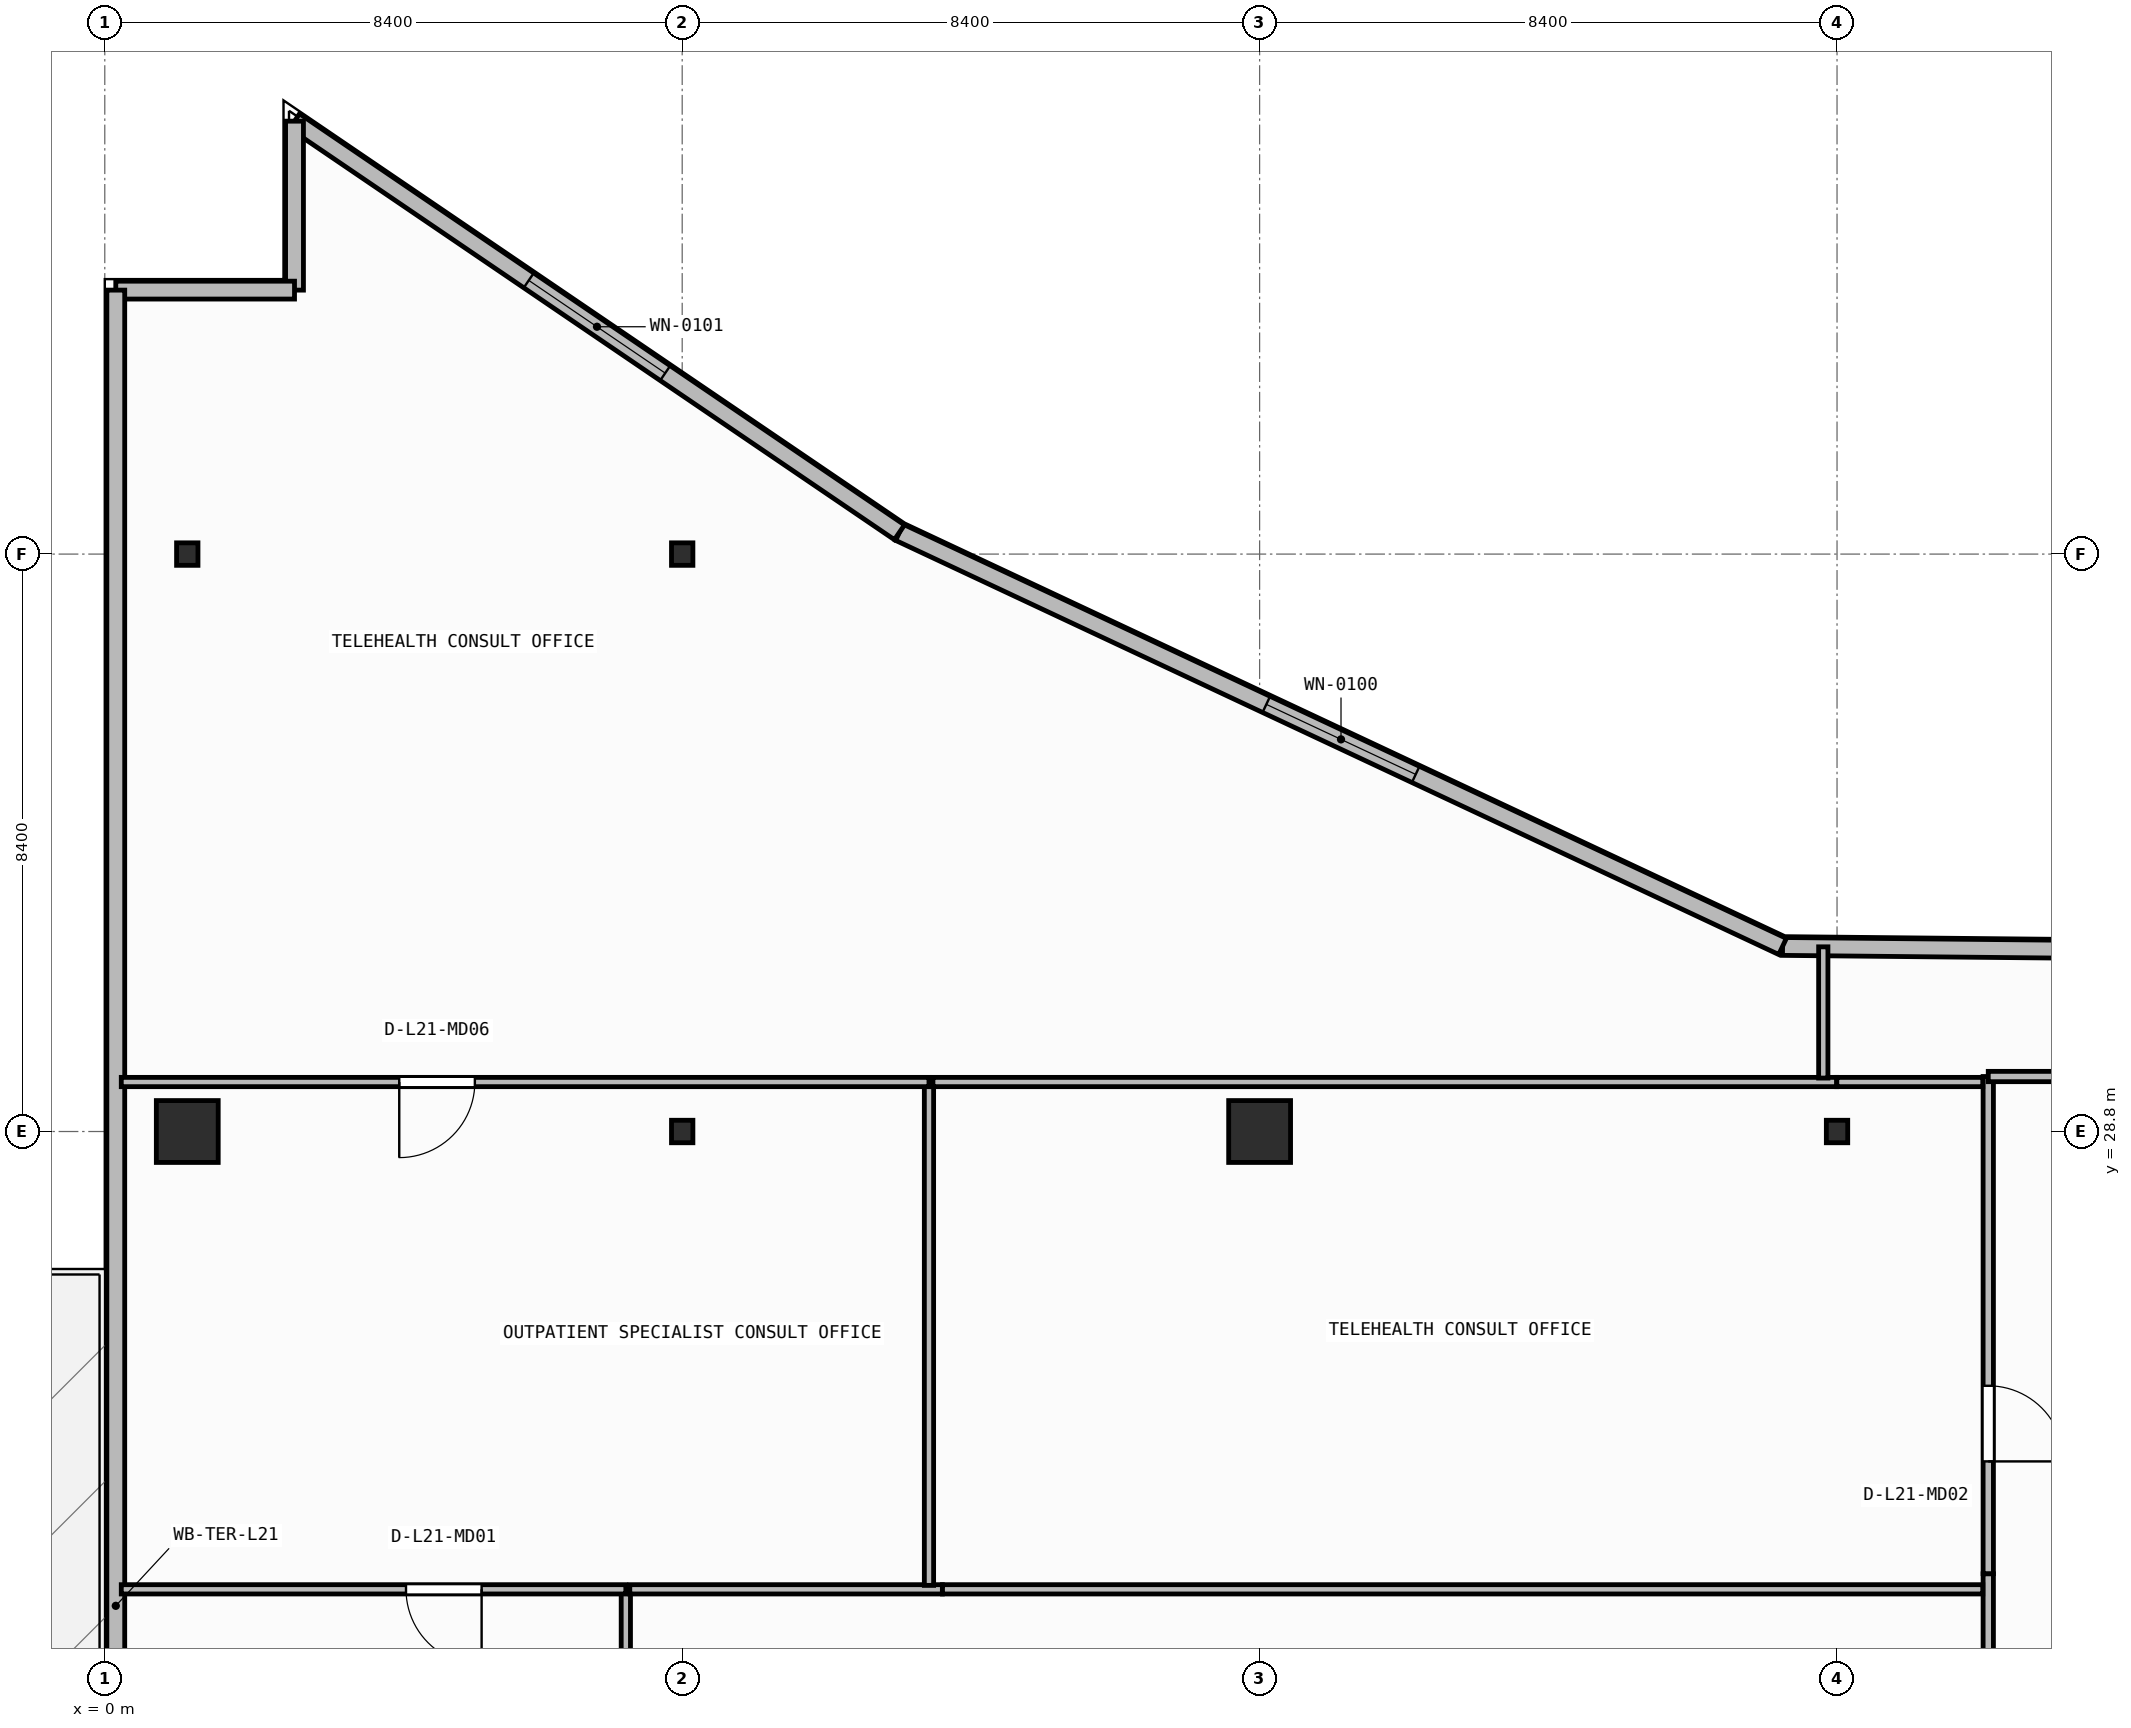
"""IFC4 building model, lengths in metres.
Left out: names, types, materials, properties, quantities, classifications, styles, units other than length and angle.
Written with IfcOpenShell. Run it as: python <this file> out.ifc"""

import sys

from ifc_helpers import new_model, si_unit, direction, frame, frame_2d, origin, origin_2d, place, context, subcontext, project, spatial, rectangle, i_section, extrude, element, fill, save


model = new_model("IFC4")
c1 = context("Model", 3, precision=1e-05, world=origin(), true_north=direction((0.0, 1.0)))
c2 = subcontext(c1, "Body", "Model", "MODEL_VIEW")
j1 = project(units=[si_unit("LENGTHUNIT", "METRE"), si_unit("PLANEANGLEUNIT", "RADIAN")], contexts=[c1])
p1 = place(None, origin())
s1 = spatial("IfcSite", under=j1, at=p1, CompositionType="ELEMENT")
p2 = place(p1, origin())
s2 = spatial("IfcBuilding", under=s1, at=p2, CompositionType="ELEMENT")
p3 = place(p2, frame((0.0, 0.0, 85.7)))
s3 = spatial("IfcBuildingStorey", under=s2, at=p3, CompositionType="ELEMENT", Elevation=85.7)
p4 = place(p3, frame((1.2, 28.8, 0.0), z_axis=(0.0, 0.0, 1.0), x_axis=(1.0, 0.0, 0.0)))
e1 = element("IfcColumn", 1, at=p4, inside=s3, PredefinedType="COLUMN", context=c2, shape_type="SweptSolid", body=[
    extrude(rectangle(XDim=0.9, YDim=0.9, at=origin_2d()), origin(), (0.0, 0.0, 1.0), 3.95),
])
p5 = place(p3, frame((8.4, 28.8, 0.0), z_axis=(0.0, 0.0, 1.0), x_axis=(1.0, 0.0, 0.0)))
e2 = element("IfcColumn", 2, at=p5, inside=s3, PredefinedType="COLUMN", context=c2, shape_type="SweptSolid", body=[
    extrude(i_section(OverallWidth=0.311, OverallDepth=0.327, WebThickness=0.016, FlangeThickness=0.025, FilletRadius=0.017, at=origin_2d()), origin(), (0.0, 0.0, 1.0), 3.95),
])
p6 = place(p3, frame((16.8, 28.8, 0.0), z_axis=(0.0, 0.0, 1.0), x_axis=(1.0, 0.0, 0.0)))
e3 = element("IfcColumn", 3, at=p6, inside=s3, PredefinedType="COLUMN", context=c2, shape_type="SweptSolid", body=[
    extrude(rectangle(XDim=0.9, YDim=0.9, at=origin_2d()), origin(), (0.0, 0.0, 1.0), 3.95),
])
for number, where, z_axis, x_axis in (
    (4, (25.2, 28.8, 0.0), (0.0, 0.0, 1.0), (1.0, 0.0, 0.0)),
    (5, (1.2, 37.2, 0.0), (0.0, 0.0, 1.0), (1.0, 0.0, 0.0)),
    (6, (8.4, 37.2, 0.0), (0.0, 0.0, 1.0), (1.0, 0.0, 0.0)),
):
    element("IfcColumn", number, at=place(p3, frame(where, z_axis=z_axis, x_axis=x_axis)), inside=s3, PredefinedType="COLUMN", context=c2, shape_type="SweptSolid", body=[
        extrude(i_section(OverallWidth=0.311, OverallDepth=0.327, WebThickness=0.016, FlangeThickness=0.025, FilletRadius=0.017, at=origin_2d()), origin(), (0.0, 0.0, 1.0), 3.95),
    ])
p7 = place(p3, frame((39.59, 31.344, 0.0), z_axis=(0.0, 0.0, 1.0), x_axis=(-0.999952362926, 0.009760731435, 0.0)))
e7 = element("IfcWall", 7, at=p7, inside=s3, PredefinedType="STANDARD", context=c2, shape_type="SweptSolid", body=[
    extrude(rectangle(XDim=15.183, YDim=0.26, at=frame_2d((7.591, 0.0))), origin(), (0.0, 0.0, 1.0), 3.71),
])
p8 = place(p7, frame((6.391, 0.0, 0.9)))
e8 = element("IfcOpeningElement", 8, at=p8, cuts=e7, PredefinedType="OPENING", context=c2, shape_type="SweptSolid", body=[
    extrude(rectangle(XDim=2.4, YDim=1.65, at=frame_2d((1.2, 0.825))), frame((0.0, 0.14, 0.0), z_axis=(0.0, -1.0, 0.0), x_axis=(1.0, 0.0, 0.0)), (0.0, 0.0, 1.0), 0.28),
])
p9 = place(p3, frame((24.408, 31.492, 0.0), z_axis=(0.0, 0.0, 1.0), x_axis=(-0.905396522918, 0.424566998585, 0.0)))
e9 = element("IfcWall", 9, at=p9, inside=s3, PredefinedType="STANDARD", context=c2, shape_type="SweptSolid", body=[
    extrude(rectangle(XDim=14.189, YDim=0.26, at=frame_2d((7.095, 0.0))), origin(), (0.0, 0.0, 1.0), 3.71),
])
p10 = place(p9, frame((5.895, 0.0, 0.9)))
e10 = element("IfcOpeningElement", 10, at=p10, cuts=e9, PredefinedType="OPENING", context=c2, shape_type="SweptSolid", body=[
    extrude(rectangle(XDim=2.4, YDim=1.65, at=frame_2d((1.2, 0.825))), frame((0.0, 0.14, 0.0), z_axis=(0.0, -1.0, 0.0), x_axis=(1.0, 0.0, 0.0)), (0.0, 0.0, 1.0), 0.28),
])
p11 = place(p3, frame((11.561, 37.517, 0.0), z_axis=(0.0, 0.0, 1.0), x_axis=(-0.827064743936, 0.562106670782, 0.0)))
e11 = element("IfcWall", 11, at=p11, inside=s3, PredefinedType="STANDARD", context=c2, shape_type="SweptSolid", body=[
    extrude(rectangle(XDim=10.641, YDim=0.26, at=frame_2d((5.32, 0.0))), origin(), (0.0, 0.0, 1.0), 3.71),
])
p12 = place(p11, frame((4.12, 0.0, 0.9)))
e12 = element("IfcOpeningElement", 12, at=p12, cuts=e11, PredefinedType="OPENING", context=c2, shape_type="SweptSolid", body=[
    extrude(rectangle(XDim=2.4, YDim=1.65, at=frame_2d((1.2, 0.825))), frame((0.0, 0.14, 0.0), z_axis=(0.0, -1.0, 0.0), x_axis=(1.0, 0.0, 0.0)), (0.0, 0.0, 1.0), 0.28),
])
p13 = place(p3, frame((2.76, 43.498, 0.0), z_axis=(0.0, 0.0, 1.0), x_axis=(0.0, -1.0, 0.0)))
e13 = element("IfcWall", 13, at=p13, inside=s3, PredefinedType="STANDARD", context=c2, shape_type="SweptSolid", body=[
    extrude(rectangle(XDim=2.458, YDim=0.26, at=frame_2d((1.229, 0.0))), origin(), (0.0, 0.0, 1.0), 3.71),
])
p14 = place(p3, frame((2.76, 41.04, 0.0), z_axis=(0.0, 0.0, 1.0), x_axis=(-1.0, 0.0, 0.0)))
e14 = element("IfcWall", 14, at=p14, inside=s3, PredefinedType="STANDARD", context=c2, shape_type="SweptSolid", body=[
    extrude(rectangle(XDim=2.6, YDim=0.26, at=frame_2d((1.3, 0.0))), origin(), (0.0, 0.0, 1.0), 3.71),
])
p15 = place(p3, frame((0.16, 41.04, 0.0), z_axis=(0.0, 0.0, 1.0), x_axis=(0.0, -1.0, 0.0)))
e15 = element("IfcWall", 15, at=p15, inside=s3, PredefinedType="STANDARD", context=c2, shape_type="SweptSolid", body=[
    extrude(rectangle(XDim=38.28, YDim=0.26, at=frame_2d((19.14, 0.0))), origin(), (0.0, 0.0, 1.0), 3.71),
])
p16 = place(p15, frame((22.743, 0.0, 0.0)))
e16 = element("IfcOpeningElement", 16, at=p16, cuts=e15, PredefinedType="OPENING", context=c2, shape_type="SweptSolid", body=[
    extrude(rectangle(XDim=1.3, YDim=2.15, at=frame_2d((0.65, 1.075))), frame((0.0, 0.14, 0.0), z_axis=(0.0, -1.0, 0.0), x_axis=(1.0, 0.0, 0.0)), (0.0, 0.0, 1.0), 0.28),
])
p17 = place(p3, frame((27.4, 22.366, 0.0), z_axis=(0.0, 0.0, 1.0), x_axis=(0.0, -1.0, 0.0)))
e17 = element("IfcWall", 17, at=p17, inside=s3, PredefinedType="PARTITIONING", context=c2, shape_type="SweptSolid", body=[
    extrude(rectangle(XDim=7.666, YDim=0.15, at=frame_2d((3.833, 0.0))), origin(), (0.0, 0.0, 1.0), 3.71),
])
p18 = place(p3, frame((27.4, 29.6, 0.0), z_axis=(0.0, 0.0, 1.0), x_axis=(0.0, -1.0, 0.0)))
e18 = element("IfcWall", 18, at=p18, inside=s3, PredefinedType="PARTITIONING", context=c2, shape_type="SweptSolid", body=[
    extrude(rectangle(XDim=7.232, YDim=0.15, at=frame_2d((3.616, 0.0))), origin(), (0.0, 0.0, 1.0), 3.71),
])
p19 = place(p18, frame((4.499, 0.0, 0.0)))
e19 = element("IfcOpeningElement", 19, at=p19, cuts=e18, PredefinedType="OPENING", context=c2, shape_type="SweptSolid", body=[
    extrude(rectangle(XDim=1.1, YDim=2.1, at=frame_2d((0.55, 1.05))), frame((0.0, 0.085, 0.0), z_axis=(0.0, -1.0, 0.0), x_axis=(1.0, 0.0, 0.0)), (0.0, 0.0, 1.0), 0.17),
])
p20 = place(p3, frame((29.9, 29.6, 0.0), z_axis=(0.0, 0.0, 1.0), x_axis=(-1.0, 0.0, 0.0)))
e20 = element("IfcWall", 20, at=p20, inside=s3, PredefinedType="PARTITIONING", context=c2, shape_type="SweptSolid", body=[
    extrude(rectangle(XDim=2.5, YDim=0.15, at=frame_2d((1.25, 0.0))), origin(), (0.0, 0.0, 1.0), 3.71),
])
p21 = place(p20, frame((0.225, 0.0, 0.0)))
e21 = element("IfcOpeningElement", 21, at=p21, cuts=e20, PredefinedType="OPENING", context=c2, shape_type="SweptSolid", body=[
    extrude(rectangle(XDim=1.1, YDim=2.1, at=frame_2d((0.55, 1.05))), frame((0.0, 0.085, 0.0), z_axis=(0.0, -1.0, 0.0), x_axis=(1.0, 0.0, 0.0)), (0.0, 0.0, 1.0), 0.17),
])
p22 = place(p3, frame((7.58, 14.76, 0.0), z_axis=(0.0, 0.0, 1.0), x_axis=(0.0, 1.0, 0.0)))
e22 = element("IfcWall", 22, at=p22, inside=s3, PredefinedType="PARTITIONING", context=c2, shape_type="SweptSolid", body=[
    extrude(rectangle(XDim=7.38, YDim=0.135, at=frame_2d((3.69, 0.0))), origin(), (0.0, 0.0, 1.0), 3.71),
])
p23 = place(p3, frame((7.58, 22.14, 0.0), z_axis=(0.0, 0.0, 1.0), x_axis=(-1.0, 0.0, 0.0)))
e23 = element("IfcWall", 23, at=p23, inside=s3, PredefinedType="PARTITIONING", context=c2, shape_type="SweptSolid", body=[
    extrude(rectangle(XDim=7.34, YDim=0.135, at=frame_2d((3.67, 0.0))), origin(), (0.0, 0.0, 1.0), 3.71),
])
p24 = place(p23, frame((2.098, 0.0, 0.0)))
e24 = element("IfcOpeningElement", 24, at=p24, cuts=e23, PredefinedType="OPENING", context=c2, shape_type="SweptSolid", body=[
    extrude(rectangle(XDim=1.1, YDim=2.1, at=frame_2d((0.55, 1.05))), frame((0.0, 0.077, 0.0), z_axis=(0.0, -1.0, 0.0), x_axis=(1.0, 0.0, 0.0)), (0.0, 0.0, 1.0), 0.155),
])
p25 = place(p3, frame((12.185, 22.14, 0.0), z_axis=(0.0, 0.0, 1.0), x_axis=(-1.0, 0.0, 0.0)))
e25 = element("IfcWall", 25, at=p25, inside=s3, PredefinedType="PARTITIONING", context=c2, shape_type="SweptSolid", body=[
    extrude(rectangle(XDim=4.547, YDim=0.135, at=frame_2d((2.273, 0.0))), origin(), (0.0, 0.0, 1.0), 3.71),
])
p26 = place(p3, frame((27.32, 22.14, 0.0), z_axis=(0.0, 0.0, 1.0), x_axis=(-1.0, 0.0, 0.0)))
e26 = element("IfcWall", 26, at=p26, inside=s3, PredefinedType="PARTITIONING", context=c2, shape_type="SweptSolid", body=[
    extrude(rectangle(XDim=15.134, YDim=0.135, at=frame_2d((7.567, 0.0))), origin(), (0.0, 0.0, 1.0), 3.71),
])
p27 = place(p3, frame((11.99, 22.198, 0.0), z_axis=(0.0, 0.0, 1.0), x_axis=(0.0, 1.0, 0.0)))
e27 = element("IfcWall", 27, at=p27, inside=s3, PredefinedType="PARTITIONING", context=c2, shape_type="SweptSolid", body=[
    extrude(rectangle(XDim=7.323, YDim=0.135, at=frame_2d((3.661, 0.0))), origin(), (0.0, 0.0, 1.0), 3.71),
])
p28 = place(p3, frame((11.99, 29.52, 0.0), z_axis=(0.0, 0.0, 1.0), x_axis=(-1.0, 0.0, 0.0)))
e28 = element("IfcWall", 28, at=p28, inside=s3, PredefinedType="PARTITIONING", context=c2, shape_type="SweptSolid", body=[
    extrude(rectangle(XDim=11.75, YDim=0.135, at=frame_2d((5.875, 0.0))), origin(), (0.0, 0.0, 1.0), 3.71),
])
p29 = place(p28, frame((6.606, 0.0, 0.0)))
e29 = element("IfcOpeningElement", 29, at=p29, cuts=e28, PredefinedType="OPENING", context=c2, shape_type="SweptSolid", body=[
    extrude(rectangle(XDim=1.1, YDim=2.1, at=frame_2d((0.55, 1.05))), frame((0.0, 0.077, 0.0), z_axis=(0.0, -1.0, 0.0), x_axis=(1.0, 0.0, 0.0)), (0.0, 0.0, 1.0), 0.155),
])
p30 = place(p3, frame((25.195, 29.52, 0.0), z_axis=(0.0, 0.0, 1.0), x_axis=(-1.0, 0.0, 0.0)))
e30 = element("IfcWall", 30, at=p30, inside=s3, PredefinedType="PARTITIONING", context=c2, shape_type="SweptSolid", body=[
    extrude(rectangle(XDim=13.147, YDim=0.135, at=frame_2d((6.573, 0.0))), origin(), (0.0, 0.0, 1.0), 3.71),
])
p31 = place(p3, frame((27.32, 29.52, 0.0), z_axis=(0.0, 0.0, 1.0), x_axis=(-1.0, 0.0, 0.0)))
e31 = element("IfcWall", 31, at=p31, inside=s3, PredefinedType="PARTITIONING", context=c2, shape_type="SweptSolid", body=[
    extrude(rectangle(XDim=2.124, YDim=0.135, at=frame_2d((1.062, 0.0))), origin(), (0.0, 0.0, 1.0), 3.71),
])
p32 = place(p3, frame((25.0, 29.577, 0.0), z_axis=(0.0, 0.0, 1.0), x_axis=(0.0, 1.0, 0.0)))
e32 = element("IfcWall", 32, at=p32, inside=s3, PredefinedType="PARTITIONING", context=c2, shape_type="SweptSolid", body=[
    extrude(rectangle(XDim=1.909, YDim=0.135, at=frame_2d((0.955, 0.0))), origin(), (0.0, 0.0, 1.0), 3.71),
])
p33 = place(p10, origin())
e33 = element("IfcWindow", 33, at=p33, inside=s3, PartitioningType="SINGLE_PANEL", PredefinedType="WINDOW", context=c2, shape_type="SweptSolid", body=[
    extrude(rectangle(XDim=2.4, YDim=1.65, at=frame_2d((1.2, 0.825))), frame((0.0, 0.03, 0.0), z_axis=(0.0, -1.0, 0.0), x_axis=(1.0, 0.0, 0.0)), (0.0, 0.0, 1.0), 0.06),
])
fill(e10, e33)
p34 = place(p12, origin())
e34 = element("IfcWindow", 34, at=p34, inside=s3, PartitioningType="SINGLE_PANEL", PredefinedType="WINDOW", context=c2, shape_type="SweptSolid", body=[
    extrude(rectangle(XDim=2.4, YDim=1.65, at=frame_2d((1.2, 0.825))), frame((0.0, 0.03, 0.0), z_axis=(0.0, -1.0, 0.0), x_axis=(1.0, 0.0, 0.0)), (0.0, 0.0, 1.0), 0.06),
])
fill(e12, e34)
p35 = place(p19, origin())
e35 = element("IfcDoor", 35, at=p35, inside=s3, OperationType="SINGLE_SWING_RIGHT", PredefinedType="DOOR", context=c2, shape_type="SweptSolid", body=[
    extrude(rectangle(XDim=1.1, YDim=2.1, at=frame_2d((0.55, 1.05))), frame((0.0, 0.025, 0.0), z_axis=(0.0, -1.0, 0.0), x_axis=(1.0, 0.0, 0.0)), (0.0, 0.0, 1.0), 0.05),
])
fill(e19, e35)
p36 = place(p24, origin())
e36 = element("IfcDoor", 36, at=p36, inside=s3, OperationType="SINGLE_SWING_LEFT", PredefinedType="DOOR", context=c2, shape_type="SweptSolid", body=[
    extrude(rectangle(XDim=1.1, YDim=2.1, at=frame_2d((0.55, 1.05))), frame((0.0, 0.025, 0.0), z_axis=(0.0, -1.0, 0.0), x_axis=(1.0, 0.0, 0.0)), (0.0, 0.0, 1.0), 0.05),
])
fill(e24, e36)
p37 = place(p29, origin())
e37 = element("IfcDoor", 37, at=p37, inside=s3, OperationType="SINGLE_SWING_RIGHT", PredefinedType="DOOR", context=c2, shape_type="SweptSolid", body=[
    extrude(rectangle(XDim=1.1, YDim=2.1, at=frame_2d((0.55, 1.05))), frame((0.0, 0.025, 0.0), z_axis=(0.0, -1.0, 0.0), x_axis=(1.0, 0.0, 0.0)), (0.0, 0.0, 1.0), 0.05),
])
fill(e29, e37)
save(model, sys.argv[1])
